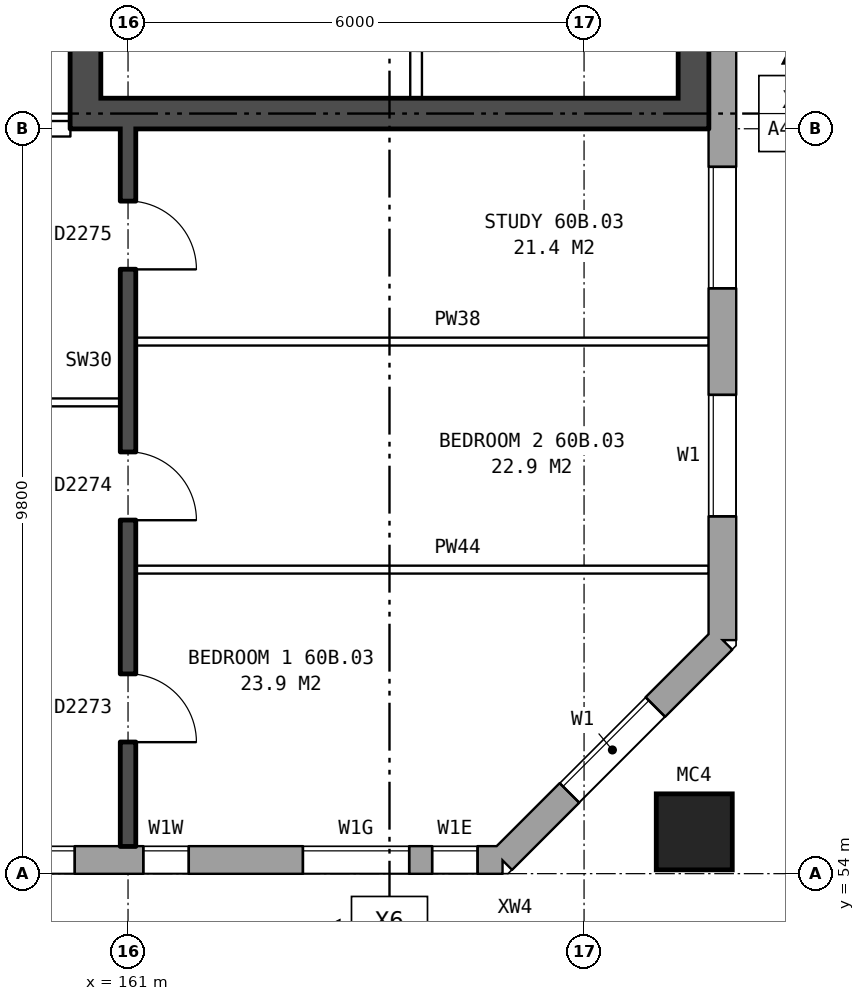
"""IFC4 building model, lengths in metres.
Left out: names, types, materials, properties, quantities, classifications, styles, units other than length and angle.
Written with IfcOpenShell. Run it as: python <this file> out.ifc"""

import sys

from ifc_helpers import new_model, si_unit, direction, frame, frame_2d, origin, origin_2d, place, context, subcontext, project, spatial, rectangle, hollow_rectangle, extrude, element, fill, save


model = new_model("IFC4")
c1 = context("Model", 3, precision=1e-05, world=origin(), true_north=direction((0.0, 1.0)))
c2 = subcontext(c1, "Body", "Model", "MODEL_VIEW")
j1 = project(units=[si_unit("LENGTHUNIT", "METRE"), si_unit("PLANEANGLEUNIT", "RADIAN")], contexts=[c1])
p1 = place(None, origin())
s1 = spatial("IfcSite", under=j1, at=p1, CompositionType="ELEMENT")
p2 = place(p1, origin())
s2 = spatial("IfcBuilding", under=s1, at=p2, CompositionType="ELEMENT")
p3 = place(p2, frame((0.0, 0.0, 212.1)))
s3 = spatial("IfcBuildingStorey", under=s2, at=p3, CompositionType="ELEMENT", Elevation=212.1)
p4 = place(p3, frame((168.45, 54.55, 0.0), z_axis=(0.0, 0.0, 1.0), x_axis=(1.0, 0.0, 0.0)))
e1 = element("IfcColumn", 1, at=p4, inside=s3, PredefinedType="COLUMN", context=c2, shape_type="SweptSolid", body=[
    extrude(hollow_rectangle(XDim=1.0, YDim=1.0, WallThickness=0.055, at=origin_2d()), origin(), (0.0, 0.0, 1.0), 3.1),
])
p5 = place(p3, frame((132.05, 54.18, 0.0), z_axis=(0.0, 0.0, 1.0), x_axis=(1.0, 0.0, 0.0)))
e2 = element("IfcWall", 2, at=p5, inside=s3, PredefinedType="STANDARD", context=c2, shape_type="SweptSolid", body=[
    extrude(rectangle(XDim=33.875, YDim=0.36, at=frame_2d((16.938, 0.0))), origin(), (0.0, 0.0, 1.0), 2.85),
])
p6 = place(p5, frame((2.65, 0.0, 0.8)))
e3 = element("IfcOpeningElement", 3, at=p6, cuts=e2, PredefinedType="OPENING", context=c2, shape_type="SweptSolid", body=[
    extrude(rectangle(XDim=1.6, YDim=1.8, at=frame_2d((0.8, 0.9))), frame((0.0, 0.19, 0.0), z_axis=(0.0, -1.0, 0.0), x_axis=(1.0, 0.0, 0.0)), (0.0, 0.0, 1.0), 0.38),
])
p7 = place(p5, frame((6.6, 0.0, 0.8)))
e4 = element("IfcOpeningElement", 4, at=p7, cuts=e2, PredefinedType="OPENING", context=c2, shape_type="SweptSolid", body=[
    extrude(rectangle(XDim=1.6, YDim=1.8, at=frame_2d((0.8, 0.9))), frame((0.0, 0.19, 0.0), z_axis=(0.0, -1.0, 0.0), x_axis=(1.0, 0.0, 0.0)), (0.0, 0.0, 1.0), 0.38),
])
p8 = place(p5, frame((8.65, 0.0, 0.8)))
e5 = element("IfcOpeningElement", 5, at=p8, cuts=e2, PredefinedType="OPENING", context=c2, shape_type="SweptSolid", body=[
    extrude(rectangle(XDim=1.6, YDim=1.8, at=frame_2d((0.8, 0.9))), frame((0.0, 0.19, 0.0), z_axis=(0.0, -1.0, 0.0), x_axis=(1.0, 0.0, 0.0)), (0.0, 0.0, 1.0), 0.38),
])
p9 = place(p5, frame((11.65, 0.0, 0.8)))
e6 = element("IfcOpeningElement", 6, at=p9, cuts=e2, PredefinedType="OPENING", context=c2, shape_type="SweptSolid", body=[
    extrude(rectangle(XDim=1.6, YDim=1.8, at=frame_2d((0.8, 0.9))), frame((0.0, 0.19, 0.0), z_axis=(0.0, -1.0, 0.0), x_axis=(1.0, 0.0, 0.0)), (0.0, 0.0, 1.0), 0.38),
])
p10 = place(p5, frame((14.65, 0.0, 0.8)))
e7 = element("IfcOpeningElement", 7, at=p10, cuts=e2, PredefinedType="OPENING", context=c2, shape_type="SweptSolid", body=[
    extrude(rectangle(XDim=1.6, YDim=1.8, at=frame_2d((0.8, 0.9))), frame((0.0, 0.19, 0.0), z_axis=(0.0, -1.0, 0.0), x_axis=(1.0, 0.0, 0.0)), (0.0, 0.0, 1.0), 0.38),
])
p11 = place(p5, frame((17.65, 0.0, 0.8)))
e8 = element("IfcOpeningElement", 8, at=p11, cuts=e2, PredefinedType="OPENING", context=c2, shape_type="SweptSolid", body=[
    extrude(rectangle(XDim=1.6, YDim=1.8, at=frame_2d((0.8, 0.9))), frame((0.0, 0.19, 0.0), z_axis=(0.0, -1.0, 0.0), x_axis=(1.0, 0.0, 0.0)), (0.0, 0.0, 1.0), 0.38),
])
p12 = place(p5, frame((20.65, 0.0, 0.8)))
e9 = element("IfcOpeningElement", 9, at=p12, cuts=e2, PredefinedType="OPENING", context=c2, shape_type="SweptSolid", body=[
    extrude(rectangle(XDim=1.6, YDim=1.8, at=frame_2d((0.8, 0.9))), frame((0.0, 0.19, 0.0), z_axis=(0.0, -1.0, 0.0), x_axis=(1.0, 0.0, 0.0)), (0.0, 0.0, 1.0), 0.38),
])
p13 = place(p5, frame((23.65, 0.0, 0.8)))
e10 = element("IfcOpeningElement", 10, at=p13, cuts=e2, PredefinedType="OPENING", context=c2, shape_type="SweptSolid", body=[
    extrude(rectangle(XDim=1.6, YDim=1.8, at=frame_2d((0.8, 0.9))), frame((0.0, 0.19, 0.0), z_axis=(0.0, -1.0, 0.0), x_axis=(1.0, 0.0, 0.0)), (0.0, 0.0, 1.0), 0.38),
])
p14 = place(p5, frame((26.65, 0.0, 0.8)))
e11 = element("IfcOpeningElement", 11, at=p14, cuts=e2, PredefinedType="OPENING", context=c2, shape_type="SweptSolid", body=[
    extrude(rectangle(XDim=1.6, YDim=1.8, at=frame_2d((0.8, 0.9))), frame((0.0, 0.19, 0.0), z_axis=(0.0, -1.0, 0.0), x_axis=(1.0, 0.0, 0.0)), (0.0, 0.0, 1.0), 0.38),
])
p15 = place(p5, frame((29.15, 0.0, 0.8)))
e12 = element("IfcOpeningElement", 12, at=p15, cuts=e2, PredefinedType="OPENING", context=c2, shape_type="SweptSolid", body=[
    extrude(rectangle(XDim=0.6, YDim=0.9, at=frame_2d((0.3, 0.45))), frame((0.0, 0.19, 0.0), z_axis=(0.0, -1.0, 0.0), x_axis=(1.0, 0.0, 0.0)), (0.0, 0.0, 1.0), 0.38),
])
p16 = place(p5, frame((31.25, 0.0, 1.1)))
e13 = element("IfcOpeningElement", 13, at=p16, cuts=e2, PredefinedType="OPENING", context=c2, shape_type="SweptSolid", body=[
    extrude(rectangle(XDim=1.4, YDim=1.5, at=frame_2d((0.7, 0.75))), frame((0.0, 0.19, 0.0), z_axis=(0.0, -1.0, 0.0), x_axis=(1.0, 0.0, 0.0)), (0.0, 0.0, 1.0), 0.38),
])
p17 = place(p5, frame((32.95, 0.0, 0.8)))
e14 = element("IfcOpeningElement", 14, at=p17, cuts=e2, PredefinedType="OPENING", context=c2, shape_type="SweptSolid", body=[
    extrude(rectangle(XDim=0.6, YDim=1.8, at=frame_2d((0.3, 0.9))), frame((0.0, 0.19, 0.0), z_axis=(0.0, -1.0, 0.0), x_axis=(1.0, 0.0, 0.0)), (0.0, 0.0, 1.0), 0.38),
])
p18 = place(p3, frame((165.925, 54.18, 0.0), z_axis=(0.0, 0.0, 1.0), x_axis=(0.707106781187, 0.707106781187, 0.0)))
e15 = element("IfcWall", 15, at=p18, inside=s3, PredefinedType="STANDARD", context=c2, shape_type="SweptSolid", body=[
    extrude(rectangle(XDim=4.094, YDim=0.36, at=frame_2d((2.047, 0.0))), origin(), (0.0, 0.0, 1.0), 2.85),
])
p19 = place(p18, frame((1.247, 0.0, 0.8)))
e16 = element("IfcOpeningElement", 16, at=p19, cuts=e15, PredefinedType="OPENING", context=c2, shape_type="SweptSolid", body=[
    extrude(rectangle(XDim=1.6, YDim=1.8, at=frame_2d((0.8, 0.9))), frame((0.0, 0.19, 0.0), z_axis=(0.0, -1.0, 0.0), x_axis=(1.0, 0.0, 0.0)), (0.0, 0.0, 1.0), 0.38),
])
p20 = place(p3, frame((168.82, 57.075, 0.0), z_axis=(0.0, 0.0, 1.0), x_axis=(0.0, 1.0, 0.0)))
e17 = element("IfcWall", 17, at=p20, inside=s3, PredefinedType="STANDARD", context=c2, shape_type="SweptSolid", body=[
    extrude(rectangle(XDim=25.851, YDim=0.36, at=frame_2d((12.925, 0.0))), origin(), (0.0, 0.0, 1.0), 2.85),
])
p21 = place(p20, frame((1.625, 0.0, 0.8)))
e18 = element("IfcOpeningElement", 18, at=p21, cuts=e17, PredefinedType="OPENING", context=c2, shape_type="SweptSolid", body=[
    extrude(rectangle(XDim=1.6, YDim=1.8, at=frame_2d((0.8, 0.9))), frame((0.0, 0.19, 0.0), z_axis=(0.0, -1.0, 0.0), x_axis=(1.0, 0.0, 0.0)), (0.0, 0.0, 1.0), 0.38),
])
p22 = place(p20, frame((4.625, 0.0, 0.8)))
e19 = element("IfcOpeningElement", 19, at=p22, cuts=e17, PredefinedType="OPENING", context=c2, shape_type="SweptSolid", body=[
    extrude(rectangle(XDim=1.6, YDim=1.8, at=frame_2d((0.8, 0.9))), frame((0.0, 0.19, 0.0), z_axis=(0.0, -1.0, 0.0), x_axis=(1.0, 0.0, 0.0)), (0.0, 0.0, 1.0), 0.38),
])
p23 = place(p20, frame((19.625, 0.0, 0.8)))
e20 = element("IfcOpeningElement", 20, at=p23, cuts=e17, PredefinedType="OPENING", context=c2, shape_type="SweptSolid", body=[
    extrude(rectangle(XDim=1.6, YDim=1.8, at=frame_2d((0.8, 0.9))), frame((0.0, 0.19, 0.0), z_axis=(0.0, -1.0, 0.0), x_axis=(1.0, 0.0, 0.0)), (0.0, 0.0, 1.0), 0.38),
])
p24 = place(p20, frame((22.625, 0.0, 0.8)))
e21 = element("IfcOpeningElement", 21, at=p24, cuts=e17, PredefinedType="OPENING", context=c2, shape_type="SweptSolid", body=[
    extrude(rectangle(XDim=1.6, YDim=1.8, at=frame_2d((0.8, 0.9))), frame((0.0, 0.19, 0.0), z_axis=(0.0, -1.0, 0.0), x_axis=(1.0, 0.0, 0.0)), (0.0, 0.0, 1.0), 0.38),
])
p25 = place(p3, frame((160.44, 76.2, 0.0), z_axis=(0.0, 0.0, 1.0), x_axis=(0.0, -1.0, 0.0)))
e22 = element("IfcWall", 22, at=p25, inside=s3, PredefinedType="SHEAR", context=c2, shape_type="SweptSolid", body=[
    extrude(rectangle(XDim=12.4, YDim=0.4, at=frame_2d((6.2, 0.0))), origin(), (0.0, 0.0, 1.0), 2.85),
])
p26 = place(p25, frame((1.325, 0.0, 0.0)))
e23 = element("IfcOpeningElement", 23, at=p26, cuts=e22, PredefinedType="OPENING", context=c2, shape_type="SweptSolid", body=[
    extrude(rectangle(XDim=1.1, YDim=2.1, at=frame_2d((0.55, 1.05))), frame((0.0, 0.21, 0.0), z_axis=(0.0, -1.0, 0.0), x_axis=(1.0, 0.0, 0.0)), (0.0, 0.0, 1.0), 0.42),
])
p27 = place(p25, frame((3.825, 0.0, 0.0)))
e24 = element("IfcOpeningElement", 24, at=p27, cuts=e22, PredefinedType="OPENING", context=c2, shape_type="SweptSolid", body=[
    extrude(rectangle(XDim=0.85, YDim=2.1, at=frame_2d((0.425, 1.05))), frame((0.0, 0.21, 0.0), z_axis=(0.0, -1.0, 0.0), x_axis=(1.0, 0.0, 0.0)), (0.0, 0.0, 1.0), 0.42),
])
p28 = place(p25, frame((5.975, 0.0, 0.0)))
e25 = element("IfcOpeningElement", 25, at=p28, cuts=e22, PredefinedType="OPENING", context=c2, shape_type="SweptSolid", body=[
    extrude(rectangle(XDim=0.85, YDim=2.1, at=frame_2d((0.425, 1.05))), frame((0.0, 0.21, 0.0), z_axis=(0.0, -1.0, 0.0), x_axis=(1.0, 0.0, 0.0)), (0.0, 0.0, 1.0), 0.42),
])
p29 = place(p25, frame((9.9, 0.0, 0.0)))
e26 = element("IfcOpeningElement", 26, at=p29, cuts=e22, PredefinedType="OPENING", context=c2, shape_type="SweptSolid", body=[
    extrude(rectangle(XDim=1.1, YDim=2.1, at=frame_2d((0.55, 1.05))), frame((0.0, 0.21, 0.0), z_axis=(0.0, -1.0, 0.0), x_axis=(1.0, 0.0, 0.0)), (0.0, 0.0, 1.0), 0.42),
])
p30 = place(p25, frame((8.125, 0.0, 0.0)))
e27 = element("IfcOpeningElement", 27, at=p30, cuts=e22, PredefinedType="OPENING", context=c2, shape_type="SweptSolid", body=[
    extrude(rectangle(XDim=0.85, YDim=2.1, at=frame_2d((0.425, 1.05))), frame((0.0, 0.21, 0.0), z_axis=(0.0, -1.0, 0.0), x_axis=(1.0, 0.0, 0.0)), (0.0, 0.0, 1.0), 0.42),
])
p31 = place(p3, frame((168.44, 76.2, 0.0), z_axis=(0.0, 0.0, 1.0), x_axis=(0.0, -1.0, 0.0)))
e28 = element("IfcWall", 28, at=p31, inside=s3, PredefinedType="SHEAR", context=c2, shape_type="SweptSolid", body=[
    extrude(rectangle(XDim=12.4, YDim=0.4, at=frame_2d((6.2, 0.0))), origin(), (0.0, 0.0, 1.0), 2.85),
])
p32 = place(p3, frame((160.64, 64.0, 0.0), z_axis=(0.0, 0.0, 1.0), x_axis=(1.0, 0.0, 0.0)))
e29 = element("IfcWall", 29, at=p32, inside=s3, PredefinedType="SHEAR", context=c2, shape_type="SweptSolid", body=[
    extrude(rectangle(XDim=7.6, YDim=0.4, at=frame_2d((3.8, 0.0))), origin(), (0.0, 0.0, 1.0), 2.85),
])
p33 = place(p3, frame((164.79, 68.625, 0.0), z_axis=(0.0, 0.0, 1.0), x_axis=(0.0, -1.0, 0.0)))
e30 = element("IfcWall", 30, at=p33, inside=s3, PredefinedType="PARTITIONING", context=c2, shape_type="SweptSolid", body=[
    extrude(rectangle(XDim=4.425, YDim=0.15, at=frame_2d((2.212, 0.0))), origin(), (0.0, 0.0, 1.0), 2.85),
])
p34 = place(p33, frame((2.7, 0.0, 0.0)))
e31 = element("IfcOpeningElement", 31, at=p34, cuts=e30, PredefinedType="OPENING", context=c2, shape_type="SweptSolid", body=[
    extrude(rectangle(XDim=1.1, YDim=2.1, at=frame_2d((0.55, 1.05))), frame((0.0, 0.085, 0.0), z_axis=(0.0, -1.0, 0.0), x_axis=(1.0, 0.0, 0.0)), (0.0, 0.0, 1.0), 0.17),
])
p35 = place(p3, frame((161.1, 58.0, 0.0), z_axis=(0.0, 0.0, 1.0), x_axis=(1.0, 0.0, 0.0)))
e32 = element("IfcWall", 32, at=p35, inside=s3, PredefinedType="PARTITIONING", context=c2, shape_type="SweptSolid", body=[
    extrude(rectangle(XDim=7.54, YDim=0.1, at=frame_2d((3.77, 0.0))), origin(), (0.0, 0.0, 1.0), 2.85),
])
p36 = place(p3, frame((155.1, 60.2, 0.0), z_axis=(0.0, 0.0, 1.0), x_axis=(1.0, 0.0, 0.0)))
e33 = element("IfcWall", 33, at=p36, inside=s3, PredefinedType="PARTITIONING", context=c2, shape_type="SweptSolid", body=[
    extrude(rectangle(XDim=5.8, YDim=0.1, at=frame_2d((2.9, 0.0))), origin(), (0.0, 0.0, 1.0), 2.85),
])
p37 = place(p36, frame((3.6, 0.0, 0.0)))
e34 = element("IfcOpeningElement", 34, at=p37, cuts=e33, PredefinedType="OPENING", context=c2, shape_type="SweptSolid", body=[
    extrude(rectangle(XDim=0.9, YDim=2.1, at=frame_2d((0.45, 1.05))), frame((0.0, 0.06, 0.0), z_axis=(0.0, -1.0, 0.0), x_axis=(1.0, 0.0, 0.0)), (0.0, 0.0, 1.0), 0.12),
])
p38 = place(p36, frame((0.7, 0.0, 0.0)))
e35 = element("IfcOpeningElement", 35, at=p38, cuts=e33, PredefinedType="OPENING", context=c2, shape_type="SweptSolid", body=[
    extrude(rectangle(XDim=0.9, YDim=2.1, at=frame_2d((0.45, 1.05))), frame((0.0, 0.06, 0.0), z_axis=(0.0, -1.0, 0.0), x_axis=(1.0, 0.0, 0.0)), (0.0, 0.0, 1.0), 0.12),
])
p39 = place(p3, frame((161.1, 61.0, 0.0), z_axis=(0.0, 0.0, 1.0), x_axis=(1.0, 0.0, 0.0)))
e36 = element("IfcWall", 36, at=p39, inside=s3, PredefinedType="PARTITIONING", context=c2, shape_type="SweptSolid", body=[
    extrude(rectangle(XDim=7.54, YDim=0.1, at=frame_2d((3.77, 0.0))), origin(), (0.0, 0.0, 1.0), 2.85),
])
p40 = place(p3, frame((157.24, 63.8, 0.0), z_axis=(0.0, 0.0, 1.0), x_axis=(1.0, 0.0, 0.0)))
e37 = element("IfcWall", 37, at=p40, inside=s3, PredefinedType="PARTITIONING", context=c2, shape_type="SweptSolid", body=[
    extrude(rectangle(XDim=3.0, YDim=0.2, at=frame_2d((1.5, 0.0))), origin(), (0.0, 0.0, 1.0), 2.85),
])
p41 = place(p40, frame((1.0, 0.0, 0.0)))
e38 = element("IfcOpeningElement", 38, at=p41, cuts=e37, PredefinedType="OPENING", context=c2, shape_type="SweptSolid", body=[
    extrude(rectangle(XDim=1.0, YDim=2.1, at=frame_2d((0.5, 1.05))), frame((0.0, 0.11, 0.0), z_axis=(0.0, -1.0, 0.0), x_axis=(1.0, 0.0, 0.0)), (0.0, 0.0, 1.0), 0.22),
])
p42 = place(p3, frame((161.0, 54.36, 0.0), z_axis=(0.0, 0.0, 1.0), x_axis=(0.0, 1.0, 0.0)))
e39 = element("IfcWall", 39, at=p42, inside=s3, PredefinedType="SOLIDWALL", context=c2, shape_type="SweptSolid", body=[
    extrude(rectangle(XDim=9.44, YDim=0.2, at=frame_2d((4.72, 0.0))), origin(), (0.0, 0.0, 1.0), 2.85),
])
p43 = place(p42, frame((1.37, 0.0, 0.0)))
e40 = element("IfcOpeningElement", 40, at=p43, cuts=e39, PredefinedType="OPENING", context=c2, shape_type="SweptSolid", body=[
    extrude(rectangle(XDim=0.9, YDim=2.1, at=frame_2d((0.45, 1.05))), frame((0.0, 0.11, 0.0), z_axis=(0.0, -1.0, 0.0), x_axis=(1.0, 0.0, 0.0)), (0.0, 0.0, 1.0), 0.22),
])
p44 = place(p42, frame((4.29, 0.0, 0.0)))
e41 = element("IfcOpeningElement", 41, at=p44, cuts=e39, PredefinedType="OPENING", context=c2, shape_type="SweptSolid", body=[
    extrude(rectangle(XDim=0.9, YDim=2.1, at=frame_2d((0.45, 1.05))), frame((0.0, 0.11, 0.0), z_axis=(0.0, -1.0, 0.0), x_axis=(1.0, 0.0, 0.0)), (0.0, 0.0, 1.0), 0.22),
])
p45 = place(p42, frame((7.59, 0.0, 0.0)))
e42 = element("IfcOpeningElement", 42, at=p45, cuts=e39, PredefinedType="OPENING", context=c2, shape_type="SweptSolid", body=[
    extrude(rectangle(XDim=0.9, YDim=2.1, at=frame_2d((0.45, 1.05))), frame((0.0, 0.11, 0.0), z_axis=(0.0, -1.0, 0.0), x_axis=(1.0, 0.0, 0.0)), (0.0, 0.0, 1.0), 0.22),
])
p46 = place(p14, origin())
e43 = element("IfcWindow", 43, at=p46, inside=s3, PartitioningType="SINGLE_PANEL", PredefinedType="WINDOW", context=c2, shape_type="SweptSolid", body=[
    extrude(rectangle(XDim=1.6, YDim=1.8, at=frame_2d((0.8, 0.9))), frame((0.0, 0.15, 0.0), z_axis=(0.0, -1.0, 0.0), x_axis=(1.0, 0.0, 0.0)), (0.0, 0.0, 1.0), 0.06),
])
fill(e11, e43)
p47 = place(p15, origin())
e44 = element("IfcWindow", 44, at=p47, inside=s3, PartitioningType="SINGLE_PANEL", PredefinedType="WINDOW", context=c2, shape_type="SweptSolid", body=[
    extrude(rectangle(XDim=0.6, YDim=0.9, at=frame_2d((0.3, 0.45))), frame((0.0, 0.15, 0.0), z_axis=(0.0, -1.0, 0.0), x_axis=(1.0, 0.0, 0.0)), (0.0, 0.0, 1.0), 0.06),
])
fill(e12, e44)
p48 = place(p19, origin())
e45 = element("IfcWindow", 45, at=p48, inside=s3, PartitioningType="SINGLE_PANEL", PredefinedType="WINDOW", context=c2, shape_type="SweptSolid", body=[
    extrude(rectangle(XDim=1.6, YDim=1.8, at=frame_2d((0.8, 0.9))), frame((0.0, 0.15, 0.0), z_axis=(0.0, -1.0, 0.0), x_axis=(1.0, 0.0, 0.0)), (0.0, 0.0, 1.0), 0.06),
])
fill(e16, e45)
p49 = place(p21, origin())
e46 = element("IfcWindow", 46, at=p49, inside=s3, PartitioningType="SINGLE_PANEL", PredefinedType="WINDOW", context=c2, shape_type="SweptSolid", body=[
    extrude(rectangle(XDim=1.6, YDim=1.8, at=frame_2d((0.8, 0.9))), frame((0.0, 0.15, 0.0), z_axis=(0.0, -1.0, 0.0), x_axis=(1.0, 0.0, 0.0)), (0.0, 0.0, 1.0), 0.06),
])
fill(e18, e46)
p50 = place(p22, origin())
e47 = element("IfcWindow", 47, at=p50, inside=s3, PartitioningType="SINGLE_PANEL", PredefinedType="WINDOW", context=c2, shape_type="SweptSolid", body=[
    extrude(rectangle(XDim=1.6, YDim=1.8, at=frame_2d((0.8, 0.9))), frame((0.0, 0.15, 0.0), z_axis=(0.0, -1.0, 0.0), x_axis=(1.0, 0.0, 0.0)), (0.0, 0.0, 1.0), 0.06),
])
fill(e19, e47)
p51 = place(p43, frame((0.9, 0.0, 0.0), z_axis=(0.0, 0.0, 1.0), x_axis=(-1.0, 0.0, 0.0)))
e48 = element("IfcDoor", 48, at=p51, inside=s3, OperationType="SINGLE_SWING_RIGHT", PredefinedType="DOOR", context=c2, shape_type="SweptSolid", body=[
    extrude(rectangle(XDim=0.9, YDim=2.1, at=frame_2d((0.45, 1.05))), frame((0.0, 0.025, 0.0), z_axis=(0.0, -1.0, 0.0), x_axis=(1.0, 0.0, 0.0)), (0.0, 0.0, 1.0), 0.05),
])
fill(e40, e48)
p52 = place(p44, frame((0.9, 0.0, 0.0), z_axis=(0.0, 0.0, 1.0), x_axis=(-1.0, 0.0, 0.0)))
e49 = element("IfcDoor", 49, at=p52, inside=s3, OperationType="SINGLE_SWING_RIGHT", PredefinedType="DOOR", context=c2, shape_type="SweptSolid", body=[
    extrude(rectangle(XDim=0.9, YDim=2.1, at=frame_2d((0.45, 1.05))), frame((0.0, 0.025, 0.0), z_axis=(0.0, -1.0, 0.0), x_axis=(1.0, 0.0, 0.0)), (0.0, 0.0, 1.0), 0.05),
])
fill(e41, e49)
p53 = place(p45, frame((0.9, 0.0, 0.0), z_axis=(0.0, 0.0, 1.0), x_axis=(-1.0, 0.0, 0.0)))
e50 = element("IfcDoor", 50, at=p53, inside=s3, OperationType="SINGLE_SWING_RIGHT", PredefinedType="DOOR", context=c2, shape_type="SweptSolid", body=[
    extrude(rectangle(XDim=0.9, YDim=2.1, at=frame_2d((0.45, 1.05))), frame((0.0, 0.025, 0.0), z_axis=(0.0, -1.0, 0.0), x_axis=(1.0, 0.0, 0.0)), (0.0, 0.0, 1.0), 0.05),
])
fill(e42, e50)
p54 = place(p16, origin())
e51 = element("IfcWindow", 51, at=p54, inside=s3, PartitioningType="SINGLE_PANEL", PredefinedType="WINDOW", context=c2, shape_type="SweptSolid", body=[
    extrude(rectangle(XDim=1.4, YDim=1.5, at=frame_2d((0.7, 0.75))), frame((0.0, 0.15, 0.0), z_axis=(0.0, -1.0, 0.0), x_axis=(1.0, 0.0, 0.0)), (0.0, 0.0, 1.0), 0.06),
])
fill(e13, e51)
p55 = place(p17, origin())
e52 = element("IfcWindow", 52, at=p55, inside=s3, PartitioningType="SINGLE_PANEL", PredefinedType="WINDOW", context=c2, shape_type="SweptSolid", body=[
    extrude(rectangle(XDim=0.6, YDim=1.8, at=frame_2d((0.3, 0.9))), frame((0.0, 0.15, 0.0), z_axis=(0.0, -1.0, 0.0), x_axis=(1.0, 0.0, 0.0)), (0.0, 0.0, 1.0), 0.06),
])
fill(e14, e52)
save(model, sys.argv[1])
